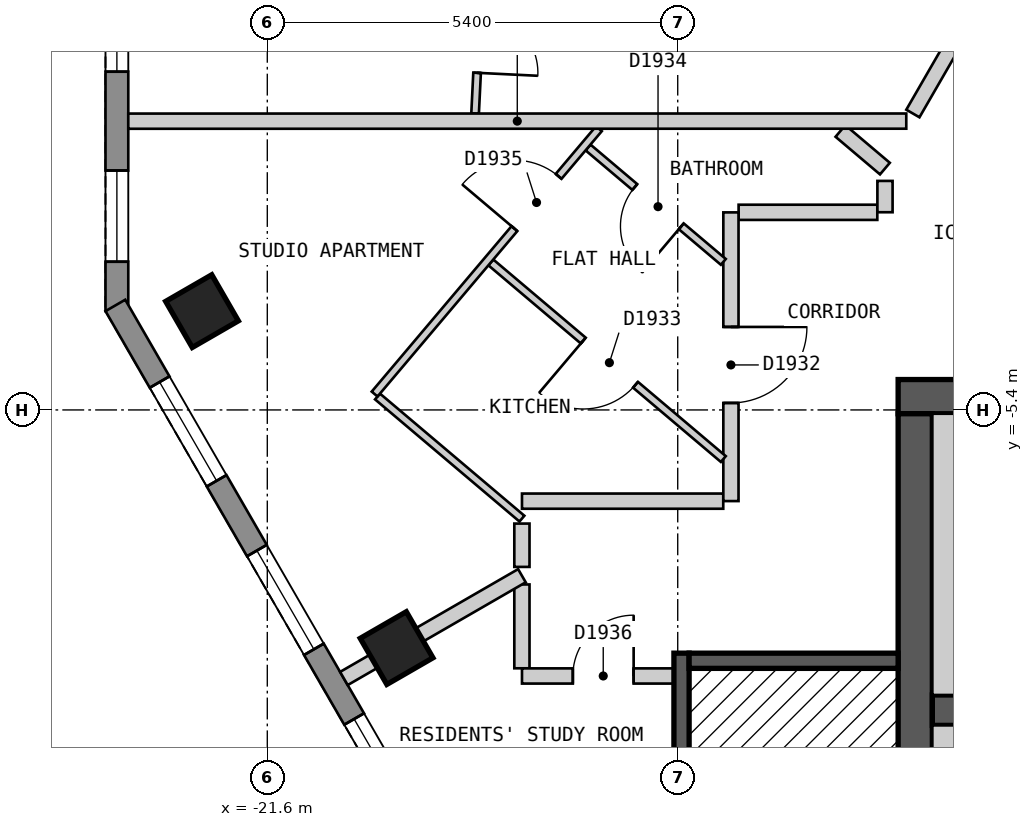
"""IFC4 building model, lengths in metres.
Left out: names, types, materials, properties, quantities, classifications, styles, units other than length and angle.
Written with IfcOpenShell. Run it as: python <this file> out.ifc"""

import sys

from ifc_helpers import new_model, si_unit, direction, frame, frame_2d, origin, origin_2d, place, context, subcontext, project, spatial, polyline, rectangle, outline, extrude, element, fill, save


model = new_model("IFC4")
c1 = context("Model", 3, precision=1e-05, world=origin(), true_north=direction((0.0, 1.0)))
c2 = subcontext(c1, "Body", "Model", "MODEL_VIEW")
j1 = project(units=[si_unit("LENGTHUNIT", "METRE"), si_unit("PLANEANGLEUNIT", "RADIAN")], contexts=[c1])
p1 = place(None, origin())
s1 = spatial("IfcSite", under=j1, at=p1, CompositionType="ELEMENT")
p2 = place(p1, origin())
s2 = spatial("IfcBuilding", under=s1, at=p2, CompositionType="ELEMENT")
p3 = place(p2, frame((0.0, 0.0, 226.8)))
s3 = spatial("IfcBuildingStorey", under=s2, at=p3, CompositionType="ELEMENT", Elevation=226.8)
for number, where, z_axis, x_axis in (
    (1, (-22.459, -4.1, 0.0), (0.0, 0.0, 1.0), (0.5, -0.866, 0.0)),
    (2, (-19.899, -8.533, 0.0), (0.0, 0.0, 1.0), (0.5, -0.866, 0.0)),
):
    element("IfcColumn", number, at=place(p3, frame(where, z_axis=z_axis, x_axis=x_axis)), inside=s3, PredefinedType="COLUMN", context=c2, shape_type="SweptSolid", body=[
        extrude(rectangle(XDim=0.7, YDim=0.7, at=origin_2d()), origin(), (0.0, 0.0, 1.0), 3.0),
    ])
p4 = place(p3, frame((-13.3, -5.225, 0.0), z_axis=(0.0, 0.0, 1.0), x_axis=(1.0, 0.0, 0.0)))
e3 = element("IfcWall", 3, at=p4, inside=s3, PredefinedType="SHEAR", context=c2, shape_type="SweptSolid", body=[
    extrude(rectangle(XDim=26.6, YDim=0.45, at=frame_2d((13.3, 0.0))), origin(), (0.0, 0.0, 1.0), 2.7),
])
p5 = place(p4, frame((23.65, 0.0, 0.0)))
e4 = element("IfcOpeningElement", 4, at=p5, cuts=e3, PredefinedType="OPENING", context=c2, shape_type="SweptSolid", body=[
    extrude(rectangle(XDim=1.2, YDim=2.1, at=frame_2d((0.6, 1.05))), frame((0.0, 0.235, 0.0), z_axis=(0.0, -1.0, 0.0), x_axis=(1.0, 0.0, 0.0)), (0.0, 0.0, 1.0), 0.47),
])
p6 = place(p3, frame((-13.075, -18.55, 0.0), z_axis=(0.0, 0.0, 1.0), x_axis=(0.0, 1.0, 0.0)))
e5 = element("IfcWall", 5, at=p6, inside=s3, PredefinedType="SHEAR", context=c2, shape_type="SweptSolid", body=[
    extrude(rectangle(XDim=13.1, YDim=0.45, at=frame_2d((6.55, 0.0))), origin(), (0.0, 0.0, 1.0), 2.7),
])
p7 = place(p6, frame((4.35, 0.0, 0.0)))
e6 = element("IfcOpeningElement", 6, at=p7, cuts=e5, PredefinedType="OPENING", context=c2, shape_type="SweptSolid", body=[
    extrude(rectangle(XDim=1.2, YDim=2.1, at=frame_2d((0.6, 1.05))), frame((0.0, 0.235, 0.0), z_axis=(0.0, -1.0, 0.0), x_axis=(1.0, 0.0, 0.0)), (0.0, 0.0, 1.0), 0.47),
])
p8 = place(p3, frame((-12.85, -9.35, 0.0), z_axis=(0.0, 0.0, 1.0), x_axis=(1.0, 0.0, 0.0)))
e7 = element("IfcWall", 7, at=p8, inside=s3, PredefinedType="SHEAR", context=c2, shape_type="SweptSolid", body=[
    extrude(rectangle(XDim=23.05, YDim=0.4, at=frame_2d((11.525, 0.0))), origin(), (0.0, 0.0, 1.0), 2.7),
])
p9 = place(p8, frame((1.45, 0.0, 0.0)))
e8 = element("IfcOpeningElement", 8, at=p9, cuts=e7, PredefinedType="OPENING", context=c2, shape_type="SweptSolid", body=[
    extrude(rectangle(XDim=1.1, YDim=2.1, at=frame_2d((0.55, 1.05))), frame((0.0, 0.21, 0.0), z_axis=(0.0, -1.0, 0.0), x_axis=(1.0, 0.0, 0.0)), (0.0, 0.0, 1.0), 0.42),
])
p10 = place(p8, frame((4.25, 0.0, 0.0)))
e9 = element("IfcOpeningElement", 9, at=p10, cuts=e7, PredefinedType="OPENING", context=c2, shape_type="SweptSolid", body=[
    extrude(rectangle(XDim=1.1, YDim=2.1, at=frame_2d((0.55, 1.05))), frame((0.0, 0.21, 0.0), z_axis=(0.0, -1.0, 0.0), x_axis=(1.0, 0.0, 0.0)), (0.0, 0.0, 1.0), 0.42),
])
p11 = place(p8, frame((7.05, 0.0, 0.0)))
e10 = element("IfcOpeningElement", 10, at=p11, cuts=e7, PredefinedType="OPENING", context=c2, shape_type="SweptSolid", body=[
    extrude(rectangle(XDim=1.1, YDim=2.1, at=frame_2d((0.55, 1.05))), frame((0.0, 0.21, 0.0), z_axis=(0.0, -1.0, 0.0), x_axis=(1.0, 0.0, 0.0)), (0.0, 0.0, 1.0), 0.42),
])
p12 = place(p8, frame((9.35, 0.0, 0.0)))
e11 = element("IfcOpeningElement", 11, at=p12, cuts=e7, PredefinedType="OPENING", context=c2, shape_type="SweptSolid", body=[
    extrude(rectangle(XDim=1.1, YDim=2.1, at=frame_2d((0.55, 1.05))), frame((0.0, 0.21, 0.0), z_axis=(0.0, -1.0, 0.0), x_axis=(1.0, 0.0, 0.0)), (0.0, 0.0, 1.0), 0.42),
])
p13 = place(p8, frame((11.65, 0.0, 0.0)))
e12 = element("IfcOpeningElement", 12, at=p13, cuts=e7, PredefinedType="OPENING", context=c2, shape_type="SweptSolid", body=[
    extrude(rectangle(XDim=1.1, YDim=2.1, at=frame_2d((0.55, 1.05))), frame((0.0, 0.21, 0.0), z_axis=(0.0, -1.0, 0.0), x_axis=(1.0, 0.0, 0.0)), (0.0, 0.0, 1.0), 0.42),
])
p14 = place(p8, frame((13.95, 0.0, 0.0)))
e13 = element("IfcOpeningElement", 13, at=p14, cuts=e7, PredefinedType="OPENING", context=c2, shape_type="SweptSolid", body=[
    extrude(rectangle(XDim=1.1, YDim=2.1, at=frame_2d((0.55, 1.05))), frame((0.0, 0.21, 0.0), z_axis=(0.0, -1.0, 0.0), x_axis=(1.0, 0.0, 0.0)), (0.0, 0.0, 1.0), 0.42),
])
p15 = place(p8, frame((16.25, 0.0, 0.0)))
e14 = element("IfcOpeningElement", 14, at=p15, cuts=e7, PredefinedType="OPENING", context=c2, shape_type="SweptSolid", body=[
    extrude(rectangle(XDim=1.1, YDim=2.1, at=frame_2d((0.55, 1.05))), frame((0.0, 0.21, 0.0), z_axis=(0.0, -1.0, 0.0), x_axis=(1.0, 0.0, 0.0)), (0.0, 0.0, 1.0), 0.42),
])
p16 = place(p8, frame((18.55, 0.0, 0.0)))
e15 = element("IfcOpeningElement", 15, at=p16, cuts=e7, PredefinedType="OPENING", context=c2, shape_type="SweptSolid", body=[
    extrude(rectangle(XDim=1.1, YDim=2.1, at=frame_2d((0.55, 1.05))), frame((0.0, 0.21, 0.0), z_axis=(0.0, -1.0, 0.0), x_axis=(1.0, 0.0, 0.0)), (0.0, 0.0, 1.0), 0.42),
])
p17 = place(p8, frame((20.95, 0.0, 0.0)))
e16 = element("IfcOpeningElement", 16, at=p17, cuts=e7, PredefinedType="OPENING", context=c2, shape_type="SweptSolid", body=[
    extrude(rectangle(XDim=1.1, YDim=2.1, at=frame_2d((0.55, 1.05))), frame((0.0, 0.21, 0.0), z_axis=(0.0, -1.0, 0.0), x_axis=(1.0, 0.0, 0.0)), (0.0, 0.0, 1.0), 0.42),
])
p18 = place(p3, frame((-23.579, 0.9, 0.0), z_axis=(0.0, 0.0, 1.0), x_axis=(0.0, -1.0, 0.0)))
e17 = element("IfcWall", 17, at=p18, inside=s3, PredefinedType="SOLIDWALL", context=c2, shape_type="SweptSolid", body=[
    extrude(outline(polyline([(0.0, -0.15), (5.0, -0.15), (4.92, 0.15), (0.08, 0.15), (0.0, -0.15)])), origin(), (0.0, 0.0, 1.0), 2.7),
])
p19 = place(p18, frame((0.65, 0.0, 0.15)))
e18 = element("IfcOpeningElement", 18, at=p19, cuts=e17, PredefinedType="OPENING", context=c2, shape_type="SweptSolid", body=[
    extrude(rectangle(XDim=1.2, YDim=2.1, at=frame_2d((0.6, 1.05))), frame((0.0, 0.16, 0.0), z_axis=(0.0, -1.0, 0.0), x_axis=(1.0, 0.0, 0.0)), (0.0, 0.0, 1.0), 0.32),
])
p20 = place(p18, frame((3.15, 0.0, 0.15)))
e19 = element("IfcOpeningElement", 19, at=p20, cuts=e17, PredefinedType="OPENING", context=c2, shape_type="SweptSolid", body=[
    extrude(rectangle(XDim=1.2, YDim=2.1, at=frame_2d((0.6, 1.05))), frame((0.0, 0.16, 0.0), z_axis=(0.0, -1.0, 0.0), x_axis=(1.0, 0.0, 0.0)), (0.0, 0.0, 1.0), 0.32),
])
p21 = place(p3, frame((-23.599, -4.025, 0.0), z_axis=(0.0, 0.0, 1.0), x_axis=(0.500012653391, -0.866018098222, 0.0)))
e20 = element("IfcWall", 20, at=p21, inside=s3, PredefinedType="SOLIDWALL", context=c2, shape_type="SweptSolid", body=[
    extrude(outline(polyline([(0.0, -0.15), (16.628, -0.15), (16.548, 0.15), (0.08, 0.15), (0.0, -0.15)])), origin(), (0.0, 0.0, 1.0), 2.7),
])
p22 = place(p21, frame((1.164, 0.0, 0.15)))
e21 = element("IfcOpeningElement", 21, at=p22, cuts=e20, PredefinedType="OPENING", context=c2, shape_type="SweptSolid", body=[
    extrude(rectangle(XDim=1.5, YDim=2.1, at=frame_2d((0.75, 1.05))), frame((0.0, 0.16, 0.0), z_axis=(0.0, -1.0, 0.0), x_axis=(1.0, 0.0, 0.0)), (0.0, 0.0, 1.0), 0.32),
])
p23 = place(p21, frame((3.724, 0.0, 0.15)))
e22 = element("IfcOpeningElement", 22, at=p23, cuts=e20, PredefinedType="OPENING", context=c2, shape_type="SweptSolid", body=[
    extrude(rectangle(XDim=1.5, YDim=2.1, at=frame_2d((0.75, 1.05))), frame((0.0, 0.16, 0.0), z_axis=(0.0, -1.0, 0.0), x_axis=(1.0, 0.0, 0.0)), (0.0, 0.0, 1.0), 0.32),
])
p24 = place(p21, frame((6.283, 0.0, 0.15)))
e23 = element("IfcOpeningElement", 23, at=p24, cuts=e20, PredefinedType="OPENING", context=c2, shape_type="SweptSolid", body=[
    extrude(rectangle(XDim=1.5, YDim=2.1, at=frame_2d((0.75, 1.05))), frame((0.0, 0.16, 0.0), z_axis=(0.0, -1.0, 0.0), x_axis=(1.0, 0.0, 0.0)), (0.0, 0.0, 1.0), 0.32),
])
p25 = place(p21, frame((8.843, 0.0, 0.15)))
e24 = element("IfcOpeningElement", 24, at=p25, cuts=e20, PredefinedType="OPENING", context=c2, shape_type="SweptSolid", body=[
    extrude(rectangle(XDim=1.5, YDim=2.1, at=frame_2d((0.75, 1.05))), frame((0.0, 0.16, 0.0), z_axis=(0.0, -1.0, 0.0), x_axis=(1.0, 0.0, 0.0)), (0.0, 0.0, 1.0), 0.32),
])
p26 = place(p21, frame((11.403, 0.0, 0.15)))
e25 = element("IfcOpeningElement", 25, at=p26, cuts=e20, PredefinedType="OPENING", context=c2, shape_type="SweptSolid", body=[
    extrude(rectangle(XDim=1.5, YDim=2.1, at=frame_2d((0.75, 1.05))), frame((0.0, 0.16, 0.0), z_axis=(0.0, -1.0, 0.0), x_axis=(1.0, 0.0, 0.0)), (0.0, 0.0, 1.0), 0.32),
])
p27 = place(p21, frame((13.962, 0.0, 0.15)))
e26 = element("IfcOpeningElement", 26, at=p27, cuts=e20, PredefinedType="OPENING", context=c2, shape_type="SweptSolid", body=[
    extrude(rectangle(XDim=1.5, YDim=2.1, at=frame_2d((0.75, 1.05))), frame((0.0, 0.16, 0.0), z_axis=(0.0, -1.0, 0.0), x_axis=(1.0, 0.0, 0.0)), (0.0, 0.0, 1.0), 0.32),
])
p28 = place(p3, frame((-18.25, -7.696, 0.0), z_axis=(0.0, 0.0, 1.0), x_axis=(0.0, -1.0, 0.0)))
e27 = element("IfcWall", 27, at=p28, inside=s3, PredefinedType="PARTITIONING", context=c2, shape_type="SweptSolid", body=[
    extrude(rectangle(XDim=1.103, YDim=0.2, at=frame_2d((0.552, 0.0))), origin(), (0.0, 0.0, 1.0), 2.7),
])
p29 = place(p3, frame((-18.249, -6.6, 0.0), z_axis=(0.0, 0.0, 1.0), x_axis=(1.0, 0.0, 0.0)))
e28 = element("IfcWall", 28, at=p29, inside=s3, PredefinedType="PARTITIONING", context=c2, shape_type="SweptSolid", body=[
    extrude(rectangle(XDim=2.648, YDim=0.2, at=frame_2d((1.324, 0.0))), origin(), (0.0, 0.0, 1.0), 2.7),
])
p30 = place(p3, frame((-18.249, -8.9, 0.0), z_axis=(0.0, 0.0, 1.0), x_axis=(1.0, 0.0, 0.0)))
e29 = element("IfcWall", 29, at=p30, inside=s3, PredefinedType="PARTITIONING", context=c2, shape_type="SweptSolid", body=[
    extrude(rectangle(XDim=2.199, YDim=0.2, at=frame_2d((1.1, 0.0))), origin(), (0.0, 0.0, 1.0), 2.7),
])
p31 = place(p30, frame((0.669, 0.0, 0.0)))
e30 = element("IfcOpeningElement", 30, at=p31, cuts=e29, PredefinedType="OPENING", context=c2, shape_type="SweptSolid", body=[
    extrude(rectangle(XDim=0.8, YDim=2.1, at=frame_2d((0.4, 1.05))), frame((0.0, 0.11, 0.0), z_axis=(0.0, -1.0, 0.0), x_axis=(1.0, 0.0, 0.0)), (0.0, 0.0, 1.0), 0.22),
])
p32 = place(p3, frame((-15.399, -2.8, 0.0), z_axis=(0.0, 0.0, 1.0), x_axis=(1.0, 0.0, 0.0)))
e31 = element("IfcWall", 31, at=p32, inside=s3, PredefinedType="PARTITIONING", context=c2, shape_type="SweptSolid", body=[
    extrude(rectangle(XDim=1.825, YDim=0.2, at=frame_2d((0.913, 0.0))), origin(), (0.0, 0.0, 1.0), 2.7),
])
p33 = place(p3, frame((-13.106, -1.5, 0.0), z_axis=(0.0, 0.0, 1.0), x_axis=(0.500025705601, 0.86601056214, 0.0)))
e32 = element("IfcWall", 32, at=p33, inside=s3, PredefinedType="PARTITIONING", context=c2, shape_type="SweptSolid", body=[
    extrude(rectangle(XDim=7.735, YDim=0.2, at=frame_2d((3.868, 0.0))), origin(), (0.0, 0.0, 1.0), 2.7),
])
p34 = place(p3, frame((-13.473, -2.799, 0.0), z_axis=(0.0, 0.0, 1.0), x_axis=(0.0, 1.0, 0.0)))
e33 = element("IfcWall", 33, at=p34, inside=s3, PredefinedType="PARTITIONING", context=c2, shape_type="SweptSolid", body=[
    extrude(rectangle(XDim=0.412, YDim=0.2, at=frame_2d((0.206, 0.0))), origin(), (0.0, 0.0, 1.0), 2.7),
])
p35 = place(p3, frame((-15.5, -6.599, 0.0), z_axis=(0.0, 0.0, 1.0), x_axis=(0.0, 1.0, 0.0)))
e34 = element("IfcWall", 34, at=p35, inside=s3, PredefinedType="PARTITIONING", context=c2, shape_type="SweptSolid", body=[
    extrude(rectangle(XDim=3.798, YDim=0.2, at=frame_2d((1.899, 0.0))), origin(), (0.0, 0.0, 1.0), 2.7),
])
p36 = place(p35, frame((1.291, 0.0, 0.0)))
e35 = element("IfcOpeningElement", 35, at=p36, cuts=e34, PredefinedType="OPENING", context=c2, shape_type="SweptSolid", body=[
    extrude(rectangle(XDim=1.0, YDim=2.1, at=frame_2d((0.5, 1.05))), frame((0.0, 0.11, 0.0), z_axis=(0.0, -1.0, 0.0), x_axis=(1.0, 0.0, 0.0)), (0.0, 0.0, 1.0), 0.22),
])
p37 = place(p3, frame((-18.25, -7.465, 0.0), z_axis=(0.0, 0.0, 1.0), x_axis=(0.0, 1.0, 0.0)))
e36 = element("IfcWall", 36, at=p37, inside=s3, PredefinedType="PARTITIONING", context=c2, shape_type="SweptSolid", body=[
    extrude(rectangle(XDim=0.57, YDim=0.2, at=frame_2d((0.285, 0.0))), origin(), (0.0, 0.0, 1.0), 2.7),
])
p38 = place(p3, frame((-17.38, -1.947, 0.0), z_axis=(0.0, 0.0, 1.0), x_axis=(0.763616683524, -0.645669854217, 0.0)))
e37 = element("IfcWall", 37, at=p38, inside=s3, PredefinedType="PARTITIONING", context=c2, shape_type="SweptSolid", body=[
    extrude(rectangle(XDim=2.331, YDim=0.1, at=frame_2d((1.166, 0.0))), origin(), (0.0, 0.0, 1.0), 2.7),
])
p39 = place(p38, frame((0.806, 0.0, 0.0)))
e38 = element("IfcOpeningElement", 38, at=p39, cuts=e37, PredefinedType="OPENING", context=c2, shape_type="SweptSolid", body=[
    extrude(rectangle(XDim=0.8, YDim=2.1, at=frame_2d((0.4, 1.05))), frame((0.0, 0.06, 0.0), z_axis=(0.0, -1.0, 0.0), x_axis=(1.0, 0.0, 0.0)), (0.0, 0.0, 1.0), 0.12),
])
p40 = place(p3, frame((-18.659, -3.459, 0.0), z_axis=(0.0, 0.0, 1.0), x_axis=(0.763550385572, -0.64574825489, 0.0)))
e39 = element("IfcWall", 39, at=p40, inside=s3, PredefinedType="PARTITIONING", context=c2, shape_type="SweptSolid", body=[
    extrude(rectangle(XDim=4.006, YDim=0.1, at=frame_2d((2.003, 0.0))), origin(), (0.0, 0.0, 1.0), 2.7),
])
p41 = place(p40, frame((1.593, 0.0, 0.0)))
e40 = element("IfcOpeningElement", 40, at=p41, cuts=e39, PredefinedType="OPENING", context=c2, shape_type="SweptSolid", body=[
    extrude(rectangle(XDim=0.9, YDim=2.1, at=frame_2d((0.45, 1.05))), frame((0.0, 0.06, 0.0), z_axis=(0.0, -1.0, 0.0), x_axis=(1.0, 0.0, 0.0)), (0.0, 0.0, 1.0), 0.12),
])
p42 = place(p3, frame((-20.15, -5.223, 0.0), z_axis=(0.0, 0.0, 1.0), x_axis=(0.763471868926, -0.645841083672, 0.0)))
e41 = element("IfcWall", 41, at=p42, inside=s3, PredefinedType="PARTITIONING", context=c2, shape_type="SweptSolid", body=[
    extrude(rectangle(XDim=2.489, YDim=0.1, at=frame_2d((1.244, 0.0))), origin(), (0.0, 0.0, 1.0), 2.7),
])
p43 = place(p3, frame((-20.188, -5.191, 0.0), z_axis=(0.0, 0.0, 1.0), x_axis=(0.645563873658, 0.763706281909, 0.0)))
e42 = element("IfcWall", 42, at=p43, inside=s3, PredefinedType="PARTITIONING", context=c2, shape_type="SweptSolid", body=[
    extrude(rectangle(XDim=4.571, YDim=0.1, at=frame_2d((2.286, 0.0))), origin(), (0.0, 0.0, 1.0), 2.7),
])
p44 = place(p43, frame((2.85, 0.0, 0.0)))
e43 = element("IfcOpeningElement", 43, at=p44, cuts=e42, PredefinedType="OPENING", context=c2, shape_type="SweptSolid", body=[
    extrude(rectangle(XDim=0.9, YDim=2.1, at=frame_2d((0.45, 1.05))), frame((0.0, 0.06, 0.0), z_axis=(0.0, -1.0, 0.0), x_axis=(1.0, 0.0, 0.0)), (0.0, 0.0, 1.0), 0.12),
])
p45 = place(p3, frame((-18.866, -1.5, 0.0), z_axis=(0.0, 0.0, 1.0), x_axis=(0.048923533446, 0.998802526967, 0.0)))
e44 = element("IfcWall", 44, at=p45, inside=s3, PredefinedType="PARTITIONING", context=c2, shape_type="SweptSolid", body=[
    extrude(rectangle(XDim=1.921, YDim=0.1, at=frame_2d((0.96, 0.0))), origin(), (0.0, 0.0, 1.0), 2.7),
])
p46 = place(p45, frame((0.536, 0.0, 0.0)))
e45 = element("IfcOpeningElement", 45, at=p46, cuts=e44, PredefinedType="OPENING", context=c2, shape_type="SweptSolid", body=[
    extrude(rectangle(XDim=0.8, YDim=2.1, at=frame_2d((0.4, 1.05))), frame((0.0, 0.06, 0.0), z_axis=(0.0, -1.0, 0.0), x_axis=(1.0, 0.0, 0.0)), (0.0, 0.0, 1.0), 0.12),
])
p47 = place(p3, frame((-14.059, -1.73, 0.0), z_axis=(0.0, 0.0, 1.0), x_axis=(0.763289607824, -0.64605647941, 0.0)))
e46 = element("IfcWall", 46, at=p47, inside=s3, PredefinedType="PARTITIONING", context=c2, shape_type="SweptSolid", body=[
    extrude(rectangle(XDim=0.766, YDim=0.2, at=frame_2d((0.383, 0.0))), origin(), (0.0, 0.0, 1.0), 2.7),
])
p48 = place(p3, frame((-23.429, -1.601, 0.0), z_axis=(0.0, 0.0, 1.0), x_axis=(0.999999995449, 9.5406191e-05, 0.0)))
e47 = element("IfcWall", 47, at=p48, inside=s3, PredefinedType="PARTITIONING", context=c2, shape_type="SweptSolid", body=[
    extrude(rectangle(XDim=10.236, YDim=0.2, at=frame_2d((5.118, 0.0))), origin(), (0.0, 0.0, 1.0), 2.7),
])
p49 = place(p3, frame((-20.592, -8.933, 0.0), z_axis=(0.0, 0.0, 1.0), x_axis=(0.866045775131, 0.499964714133, 0.0)))
e48 = element("IfcWall", 48, at=p49, inside=s3, PredefinedType="PARTITIONING", context=c2, shape_type="SweptSolid", body=[
    extrude(rectangle(XDim=2.704, YDim=0.2, at=frame_2d((1.352, 0.0))), origin(), (0.0, 0.0, 1.0), 2.7),
])
p50 = place(p3, frame((-16.15, -14.4, 0.0), z_axis=(0.0, 0.0, 1.0), x_axis=(0.0, 1.0, 0.0)))
e49 = element("IfcWall", 49, at=p50, inside=s3, PredefinedType="SOLIDWALL", context=c2, shape_type="SweptSolid", body=[
    extrude(rectangle(XDim=5.8, YDim=0.2, at=frame_2d((2.9, 0.0))), origin(), (0.0, 0.0, 1.0), 2.7),
])
p51 = place(p3, frame((-16.05, -8.7, 0.0), z_axis=(0.0, 0.0, 1.0), x_axis=(1.0, 0.0, 0.0)))
e50 = element("IfcWall", 50, at=p51, inside=s3, PredefinedType="SOLIDWALL", context=c2, shape_type="SweptSolid", body=[
    extrude(rectangle(XDim=2.75, YDim=0.2, at=frame_2d((1.375, 0.0))), origin(), (0.0, 0.0, 1.0), 2.7),
])
p52 = place(p3, frame((-12.475, -13.0, 0.0), z_axis=(0.0, 0.0, 1.0), x_axis=(0.0, 1.0, 0.0)))
e51 = element("IfcWall", 51, at=p52, inside=s3, PredefinedType="PARTITIONING", context=c2, shape_type="SweptSolid", body=[
    extrude(rectangle(XDim=3.45, YDim=0.75, at=frame_2d((1.725, 0.0))), origin(), (0.0, 0.0, 1.0), 2.7),
])
p53 = place(p3, frame((-12.475, -9.15, 0.0), z_axis=(0.0, 0.0, 1.0), x_axis=(0.0, 1.0, 0.0)))
e52 = element("IfcWall", 52, at=p53, inside=s3, PredefinedType="SOLIDWALL", context=c2, shape_type="SweptSolid", body=[
    extrude(rectangle(XDim=3.7, YDim=0.75, at=frame_2d((1.85, 0.0))), origin(), (0.0, 0.0, 1.0), 2.7),
])
p54 = place(p19, origin())
e53 = element("IfcWindow", 53, at=p54, inside=s3, PartitioningType="SINGLE_PANEL", PredefinedType="WINDOW", context=c2, shape_type="SweptSolid", body=[
    extrude(rectangle(XDim=1.2, YDim=2.1, at=frame_2d((0.6, 1.05))), frame((0.0, 0.03, 0.0), z_axis=(0.0, -1.0, 0.0), x_axis=(1.0, 0.0, 0.0)), (0.0, 0.0, 1.0), 0.06),
])
fill(e18, e53)
p55 = place(p20, origin())
e54 = element("IfcWindow", 54, at=p55, inside=s3, PartitioningType="SINGLE_PANEL", PredefinedType="WINDOW", context=c2, shape_type="SweptSolid", body=[
    extrude(rectangle(XDim=1.2, YDim=2.1, at=frame_2d((0.6, 1.05))), frame((0.0, 0.03, 0.0), z_axis=(0.0, -1.0, 0.0), x_axis=(1.0, 0.0, 0.0)), (0.0, 0.0, 1.0), 0.06),
])
fill(e19, e54)
p56 = place(p22, origin())
e55 = element("IfcWindow", 55, at=p56, inside=s3, PartitioningType="SINGLE_PANEL", PredefinedType="WINDOW", context=c2, shape_type="SweptSolid", body=[
    extrude(rectangle(XDim=1.5, YDim=2.1, at=frame_2d((0.75, 1.05))), frame((0.0, 0.03, 0.0), z_axis=(0.0, -1.0, 0.0), x_axis=(1.0, 0.0, 0.0)), (0.0, 0.0, 1.0), 0.06),
])
fill(e21, e55)
p57 = place(p23, origin())
e56 = element("IfcWindow", 56, at=p57, inside=s3, PartitioningType="SINGLE_PANEL", PredefinedType="WINDOW", context=c2, shape_type="SweptSolid", body=[
    extrude(rectangle(XDim=1.5, YDim=2.1, at=frame_2d((0.75, 1.05))), frame((0.0, 0.03, 0.0), z_axis=(0.0, -1.0, 0.0), x_axis=(1.0, 0.0, 0.0)), (0.0, 0.0, 1.0), 0.06),
])
fill(e22, e56)
p58 = place(p24, origin())
e57 = element("IfcWindow", 57, at=p58, inside=s3, PartitioningType="SINGLE_PANEL", PredefinedType="WINDOW", context=c2, shape_type="SweptSolid", body=[
    extrude(rectangle(XDim=1.5, YDim=2.1, at=frame_2d((0.75, 1.05))), frame((0.0, 0.03, 0.0), z_axis=(0.0, -1.0, 0.0), x_axis=(1.0, 0.0, 0.0)), (0.0, 0.0, 1.0), 0.06),
])
fill(e23, e57)
p59 = place(p46, origin())
e58 = element("IfcDoor", 58, at=p59, inside=s3, OperationType="SINGLE_SWING_LEFT", PredefinedType="DOOR", context=c2, shape_type="SweptSolid", body=[
    extrude(rectangle(XDim=0.8, YDim=2.1, at=frame_2d((0.4, 1.05))), frame((0.0, 0.025, 0.0), z_axis=(0.0, -1.0, 0.0), x_axis=(1.0, 0.0, 0.0)), (0.0, 0.0, 1.0), 0.05),
])
fill(e45, e58)
p60 = place(p36, origin())
e59 = element("IfcDoor", 59, at=p60, inside=s3, OperationType="SINGLE_SWING_RIGHT", PredefinedType="DOOR", context=c2, shape_type="SweptSolid", body=[
    extrude(rectangle(XDim=1.0, YDim=2.1, at=frame_2d((0.5, 1.05))), frame((0.0, 0.025, 0.0), z_axis=(0.0, -1.0, 0.0), x_axis=(1.0, 0.0, 0.0)), (0.0, 0.0, 1.0), 0.05),
])
fill(e35, e59)
p61 = place(p41, origin())
e60 = element("IfcDoor", 60, at=p61, inside=s3, OperationType="SINGLE_SWING_LEFT", PredefinedType="DOOR", context=c2, shape_type="SweptSolid", body=[
    extrude(rectangle(XDim=0.9, YDim=2.1, at=frame_2d((0.45, 1.05))), frame((0.0, 0.025, 0.0), z_axis=(0.0, -1.0, 0.0), x_axis=(1.0, 0.0, 0.0)), (0.0, 0.0, 1.0), 0.05),
])
fill(e40, e60)
p62 = place(p39, origin())
e61 = element("IfcDoor", 61, at=p62, inside=s3, OperationType="SINGLE_SWING_RIGHT", PredefinedType="DOOR", context=c2, shape_type="SweptSolid", body=[
    extrude(rectangle(XDim=0.8, YDim=2.1, at=frame_2d((0.4, 1.05))), frame((0.0, 0.025, 0.0), z_axis=(0.0, -1.0, 0.0), x_axis=(1.0, 0.0, 0.0)), (0.0, 0.0, 1.0), 0.05),
])
fill(e38, e61)
p63 = place(p44, origin())
e62 = element("IfcDoor", 62, at=p63, inside=s3, OperationType="SINGLE_SWING_LEFT", PredefinedType="DOOR", context=c2, shape_type="SweptSolid", body=[
    extrude(rectangle(XDim=0.9, YDim=2.1, at=frame_2d((0.45, 1.05))), frame((0.0, 0.025, 0.0), z_axis=(0.0, -1.0, 0.0), x_axis=(1.0, 0.0, 0.0)), (0.0, 0.0, 1.0), 0.05),
])
fill(e43, e62)
p64 = place(p31, origin())
e63 = element("IfcDoor", 63, at=p64, inside=s3, OperationType="SINGLE_SWING_RIGHT", PredefinedType="DOOR", context=c2, shape_type="SweptSolid", body=[
    extrude(rectangle(XDim=0.8, YDim=2.1, at=frame_2d((0.4, 1.05))), frame((0.0, 0.025, 0.0), z_axis=(0.0, -1.0, 0.0), x_axis=(1.0, 0.0, 0.0)), (0.0, 0.0, 1.0), 0.05),
])
fill(e30, e63)
save(model, sys.argv[1])
